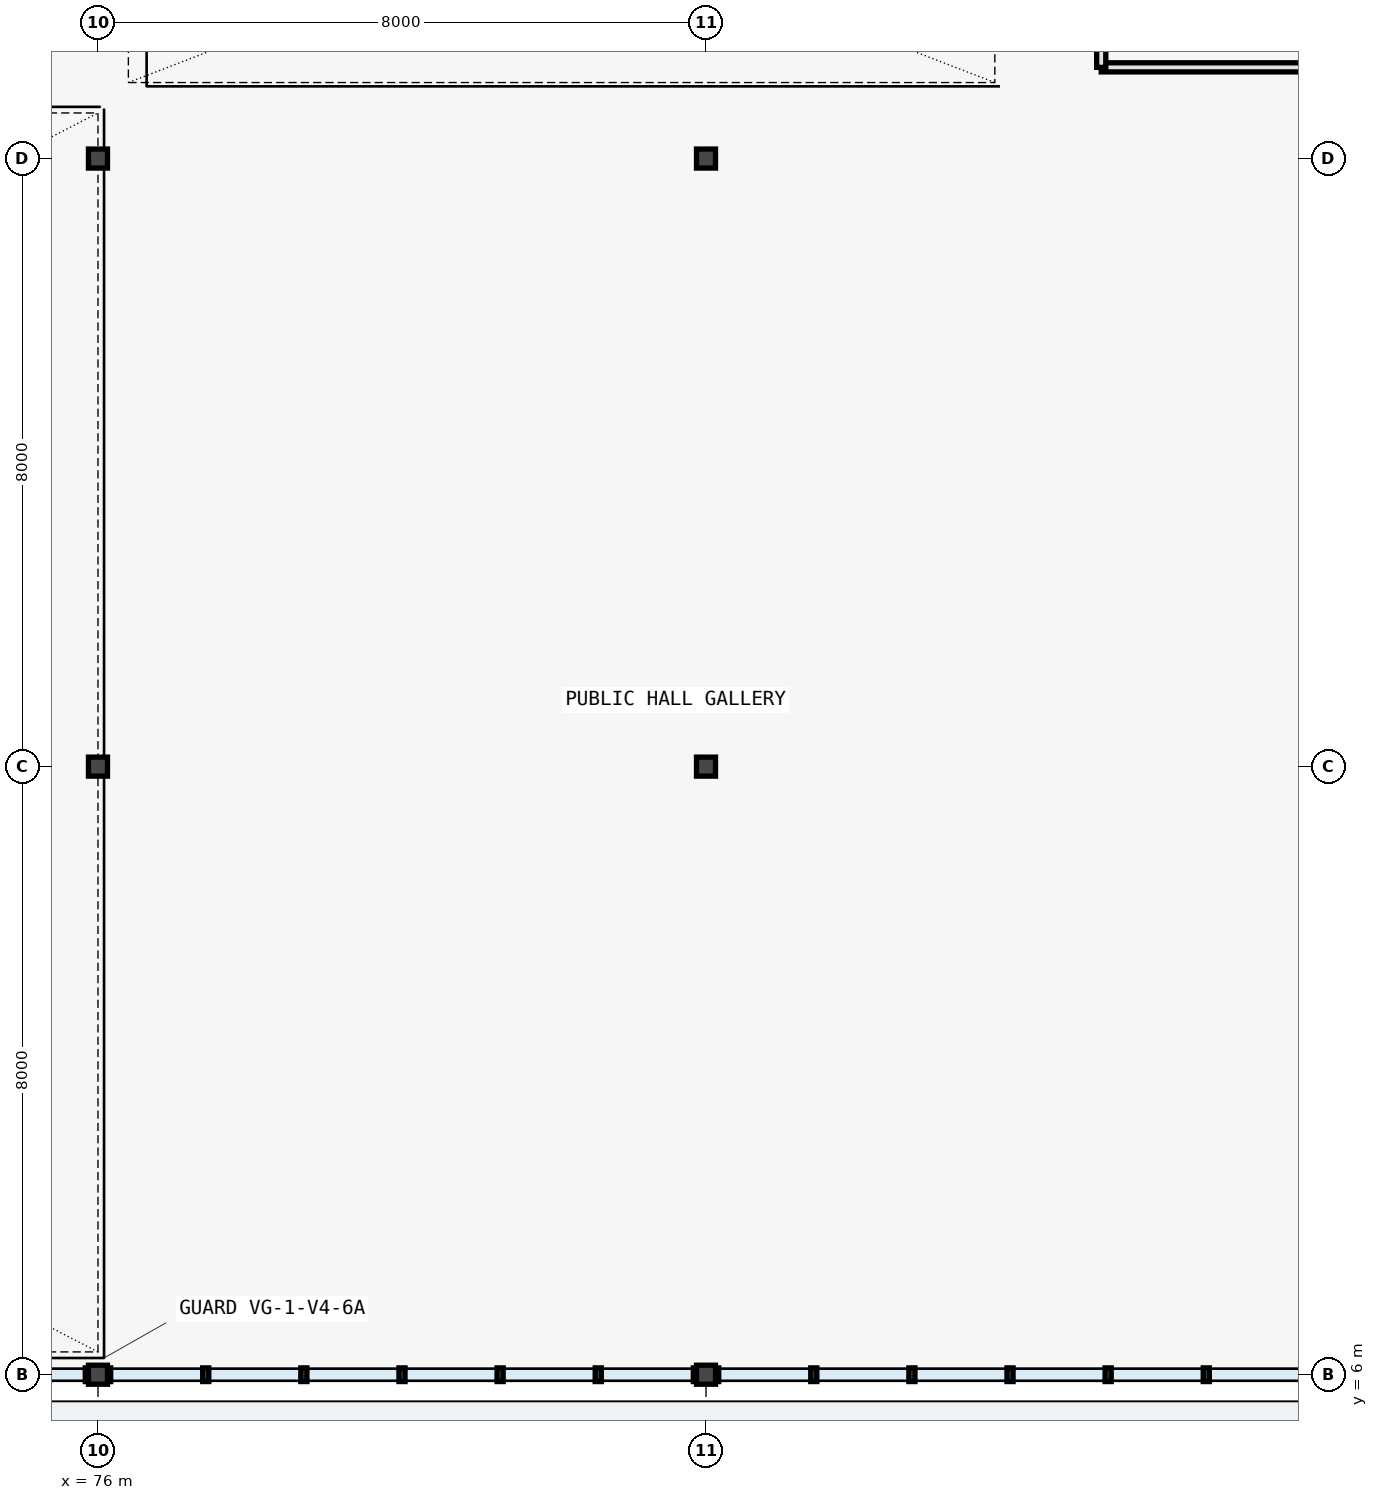
"""IFC4 building model, lengths in metres.
Left out: names, types, materials, properties, quantities, classifications, styles, units other than length and angle.
Written with IfcOpenShell. Run it as: python <this file> out.ifc"""

import sys

from ifc_helpers import new_model, si_unit, direction, frame, frame_2d, origin, origin_2d, place, context, subcontext, project, spatial, rectangle, i_section, extrude, element, save


model = new_model("IFC4")
c1 = context("Model", 3, precision=1e-05, world=origin(), true_north=direction((0.0, 1.0)))
c2 = subcontext(c1, "Body", "Model", "MODEL_VIEW")
j1 = project(units=[si_unit("LENGTHUNIT", "METRE"), si_unit("PLANEANGLEUNIT", "RADIAN")], contexts=[c1])
p1 = place(None, origin())
s1 = spatial("IfcSite", under=j1, at=p1, CompositionType="ELEMENT")
p2 = place(p1, origin())
s2 = spatial("IfcBuilding", under=s1, at=p2, CompositionType="ELEMENT")
p3 = place(p2, frame((0.0, 0.0, 5.4)))
s3 = spatial("IfcBuildingStorey", under=s2, at=p3, CompositionType="ELEMENT", Elevation=5.4)
for number, where, z_axis, x_axis in (
    (1, (76.0, 6.0, 0.0), (0.0, 0.0, 1.0), (1.0, 0.0, 0.0)),
    (2, (76.0, 14.0, 0.0), (0.0, 0.0, 1.0), (1.0, 0.0, 0.0)),
    (3, (76.0, 22.0, 0.0), (0.0, 0.0, 1.0), (1.0, 0.0, 0.0)),
    (4, (84.0, 6.0, 0.0), (0.0, 0.0, 1.0), (1.0, 0.0, 0.0)),
    (5, (84.0, 14.0, 0.0), (0.0, 0.0, 1.0), (1.0, 0.0, 0.0)),
    (6, (84.0, 22.0, 0.0), (0.0, 0.0, 1.0), (1.0, 0.0, 0.0)),
):
    element("IfcColumn", number, at=place(p3, frame(where, z_axis=z_axis, x_axis=x_axis)), inside=s3, PredefinedType="COLUMN", context=c2, shape_type="SweptSolid", body=[
        extrude(i_section(OverallWidth=0.25, OverallDepth=0.25, WebThickness=0.009, FlangeThickness=0.014, FilletRadius=0.016, at=origin_2d()), origin(), (0.0, 0.0, 1.0), 5.4),
    ])
p4 = place(p3, frame((89.2, 23.2, 0.0), z_axis=(0.0, 0.0, 1.0), x_axis=(1.0, 0.0, 0.0)))
e7 = element("IfcWall", 7, at=p4, inside=s3, PredefinedType="PARTITIONING", context=c2, shape_type="SweptSolid", body=[
    extrude(rectangle(XDim=24.4, YDim=0.12, at=frame_2d((12.2, 0.0))), origin(), (0.0, 0.0, 1.0), 5.12),
])
p5 = place(p4, frame((22.1, 0.0, 0.0)))
e8 = element("IfcOpeningElement", 8, at=p5, cuts=e7, PredefinedType="OPENING", context=c2, shape_type="SweptSolid", body=[
    extrude(rectangle(XDim=2.0, YDim=2.4, at=frame_2d((1.0, 1.2))), frame((0.0, 0.07, 0.0), z_axis=(0.0, -1.0, 0.0), x_axis=(1.0, 0.0, 0.0)), (0.0, 0.0, 1.0), 0.14),
])
p6 = place(p3, frame((89.2, 29.2, 0.0), z_axis=(0.0, 0.0, 1.0), x_axis=(0.0, -1.0, 0.0)))
e9 = element("IfcWall", 9, at=p6, inside=s3, PredefinedType="PARTITIONING", context=c2, shape_type="SweptSolid", body=[
    extrude(rectangle(XDim=6.0, YDim=0.12, at=frame_2d((3.0, 0.0))), origin(), (0.0, 0.0, 1.0), 5.12),
])
save(model, sys.argv[1])
